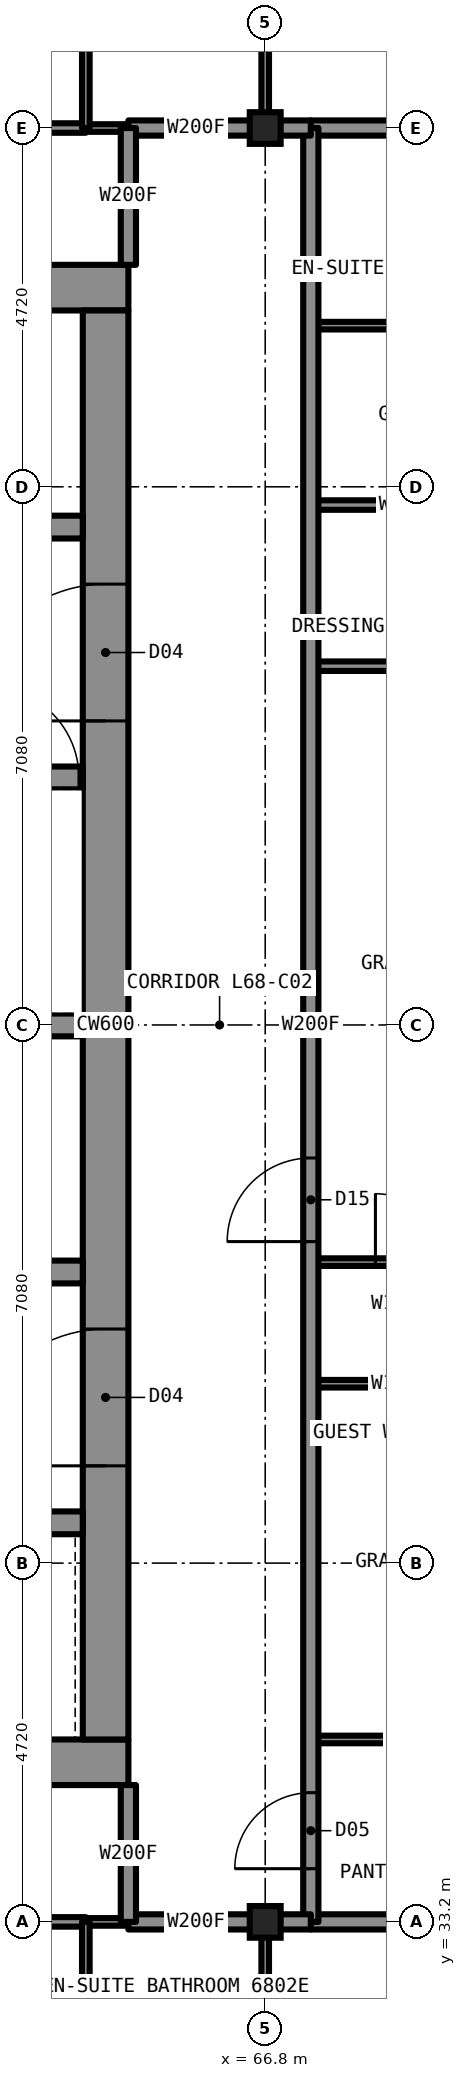
"""IFC4 building model, lengths in metres.
Left out: names, types, materials, properties, quantities, classifications, styles, units other than length and angle.
Written with IfcOpenShell. Run it as: python <this file> out.ifc"""

import sys

from ifc_helpers import new_model, si_unit, direction, frame, frame_2d, origin, origin_2d, place, context, subcontext, project, spatial, rectangle, i_section, extrude, element, fill, save


model = new_model("IFC4")
c1 = context("Model", 3, precision=1e-05, world=origin(), true_north=direction((0.0, 1.0)))
c2 = subcontext(c1, "Body", "Model", "MODEL_VIEW")
j1 = project(units=[si_unit("LENGTHUNIT", "METRE"), si_unit("PLANEANGLEUNIT", "RADIAN")], contexts=[c1])
p1 = place(None, origin())
s1 = spatial("IfcSite", under=j1, at=p1, CompositionType="ELEMENT")
p2 = place(p1, origin())
s2 = spatial("IfcBuilding", under=s1, at=p2, CompositionType="ELEMENT")
p3 = place(p2, frame((0.0, 0.0, 247.7)))
s3 = spatial("IfcBuildingStorey", under=s2, at=p3, CompositionType="ELEMENT", Elevation=247.7)
for number, where, z_axis, x_axis in (
    (1, (66.8, 33.2, 0.0), (0.0, 0.0, 1.0), (1.0, 0.0, 0.0)),
    (2, (66.8, 56.8, 0.0), (0.0, 0.0, 1.0), (1.0, 0.0, 0.0)),
):
    element("IfcColumn", number, at=place(p3, frame(where, z_axis=z_axis, x_axis=x_axis)), inside=s3, PredefinedType="COLUMN", context=c2, shape_type="SweptSolid", body=[
        extrude(i_section(OverallWidth=0.406, OverallDepth=0.417, WebThickness=0.03, FlangeThickness=0.048, at=origin_2d()), origin(), (0.0, 0.0, 1.0), 3.5),
    ])
for number, where, z_axis, x_axis in (
    (3, (45.0, 54.7, 0.0), (0.0, 0.0, 1.0), (1.0, 0.0, 0.0)),
    (4, (45.0, 35.3, 0.0), (0.0, 0.0, 1.0), (1.0, 0.0, 0.0)),
):
    element("IfcWall", number, at=place(p3, frame(where, z_axis=z_axis, x_axis=x_axis)), inside=s3, PredefinedType="SHEAR", context=c2, shape_type="SweptSolid", body=[
        extrude(rectangle(XDim=20.0, YDim=0.6, at=frame_2d((10.0, 0.0))), origin(), (0.0, 0.0, 1.0), 3.5),
    ])
p4 = place(p3, frame((64.7, 35.6, 0.0), z_axis=(0.0, 0.0, 1.0), x_axis=(0.0, 1.0, 0.0)))
e5 = element("IfcWall", 5, at=p4, inside=s3, PredefinedType="SHEAR", context=c2, shape_type="SweptSolid", body=[
    extrude(rectangle(XDim=18.8, YDim=0.6, at=frame_2d((9.4, 0.0))), origin(), (0.0, 0.0, 1.0), 3.5),
])
p5 = place(p4, frame((13.4, 0.0, 0.0)))
e6 = element("IfcOpeningElement", 6, at=p5, cuts=e5, PredefinedType="OPENING", context=c2, shape_type="SweptSolid", body=[
    extrude(rectangle(XDim=1.8, YDim=2.2, at=frame_2d((0.9, 1.1))), frame((0.0, 0.31, 0.0), z_axis=(0.0, -1.0, 0.0), x_axis=(1.0, 0.0, 0.0)), (0.0, 0.0, 1.0), 0.62),
])
p6 = place(p4, frame((3.6, 0.0, 0.0)))
e7 = element("IfcOpeningElement", 7, at=p6, cuts=e5, PredefinedType="OPENING", context=c2, shape_type="SweptSolid", body=[
    extrude(rectangle(XDim=1.8, YDim=2.2, at=frame_2d((0.9, 1.1))), frame((0.0, 0.31, 0.0), z_axis=(0.0, -1.0, 0.0), x_axis=(1.0, 0.0, 0.0)), (0.0, 0.0, 1.0), 0.62),
])
p7 = place(p3, frame((45.6, 51.55, 0.0), z_axis=(0.0, 0.0, 1.0), x_axis=(1.0, 0.0, 0.0)))
e8 = element("IfcWall", 8, at=p7, inside=s3, PredefinedType="SHEAR", context=c2, shape_type="SweptSolid", body=[
    extrude(rectangle(XDim=18.8, YDim=0.3, at=frame_2d((9.4, 0.0))), origin(), (0.0, 0.0, 1.0), 3.5),
])
p8 = place(p7, frame((4.8, 0.0, 0.0)))
e9 = element("IfcOpeningElement", 9, at=p8, cuts=e8, PredefinedType="OPENING", context=c2, shape_type="SweptSolid", body=[
    extrude(rectangle(XDim=1.0, YDim=2.1, at=frame_2d((0.5, 1.05))), frame((0.0, 0.16, 0.0), z_axis=(0.0, -1.0, 0.0), x_axis=(1.0, 0.0, 0.0)), (0.0, 0.0, 1.0), 0.32),
])
p9 = place(p7, frame((11.6, 0.0, 0.0)))
e10 = element("IfcOpeningElement", 10, at=p9, cuts=e8, PredefinedType="OPENING", context=c2, shape_type="SweptSolid", body=[
    extrude(rectangle(XDim=1.1, YDim=2.2, at=frame_2d((0.55, 1.1))), frame((0.0, 0.16, 0.0), z_axis=(0.0, -1.0, 0.0), x_axis=(1.0, 0.0, 0.0)), (0.0, 0.0, 1.0), 0.32),
])
p10 = place(p7, frame((14.3, 0.0, 0.0)))
e11 = element("IfcOpeningElement", 11, at=p10, cuts=e8, PredefinedType="OPENING", context=c2, shape_type="SweptSolid", body=[
    extrude(rectangle(XDim=1.1, YDim=2.2, at=frame_2d((0.55, 1.1))), frame((0.0, 0.16, 0.0), z_axis=(0.0, -1.0, 0.0), x_axis=(1.0, 0.0, 0.0)), (0.0, 0.0, 1.0), 0.32),
])
p11 = place(p3, frame((45.6, 38.45, 0.0), z_axis=(0.0, 0.0, 1.0), x_axis=(1.0, 0.0, 0.0)))
e12 = element("IfcWall", 12, at=p11, inside=s3, PredefinedType="SHEAR", context=c2, shape_type="SweptSolid", body=[
    extrude(rectangle(XDim=18.8, YDim=0.3, at=frame_2d((9.4, 0.0))), origin(), (0.0, 0.0, 1.0), 3.5),
])
p12 = place(p11, frame((0.7, 0.0, 0.0)))
e13 = element("IfcOpeningElement", 13, at=p12, cuts=e12, PredefinedType="OPENING", context=c2, shape_type="SweptSolid", body=[
    extrude(rectangle(XDim=1.1, YDim=2.2, at=frame_2d((0.55, 1.1))), frame((0.0, 0.16, 0.0), z_axis=(0.0, -1.0, 0.0), x_axis=(1.0, 0.0, 0.0)), (0.0, 0.0, 1.0), 0.32),
])
p13 = place(p11, frame((3.4, 0.0, 0.0)))
e14 = element("IfcOpeningElement", 14, at=p13, cuts=e12, PredefinedType="OPENING", context=c2, shape_type="SweptSolid", body=[
    extrude(rectangle(XDim=1.1, YDim=2.2, at=frame_2d((0.55, 1.1))), frame((0.0, 0.16, 0.0), z_axis=(0.0, -1.0, 0.0), x_axis=(1.0, 0.0, 0.0)), (0.0, 0.0, 1.0), 0.32),
])
p14 = place(p11, frame((6.1, 0.0, 0.0)))
e15 = element("IfcOpeningElement", 15, at=p14, cuts=e12, PredefinedType="OPENING", context=c2, shape_type="SweptSolid", body=[
    extrude(rectangle(XDim=1.1, YDim=2.2, at=frame_2d((0.55, 1.1))), frame((0.0, 0.16, 0.0), z_axis=(0.0, -1.0, 0.0), x_axis=(1.0, 0.0, 0.0)), (0.0, 0.0, 1.0), 0.32),
])
p15 = place(p11, frame((8.8, 0.0, 0.0)))
e16 = element("IfcOpeningElement", 16, at=p15, cuts=e12, PredefinedType="OPENING", context=c2, shape_type="SweptSolid", body=[
    extrude(rectangle(XDim=1.1, YDim=2.2, at=frame_2d((0.55, 1.1))), frame((0.0, 0.16, 0.0), z_axis=(0.0, -1.0, 0.0), x_axis=(1.0, 0.0, 0.0)), (0.0, 0.0, 1.0), 0.32),
])
p16 = place(p3, frame((56.2, 48.25, 0.0), z_axis=(0.0, 0.0, 1.0), x_axis=(1.0, 0.0, 0.0)))
e17 = element("IfcWall", 17, at=p16, inside=s3, PredefinedType="SHEAR", context=c2, shape_type="SweptSolid", body=[
    extrude(rectangle(XDim=8.2, YDim=0.3, at=frame_2d((4.1, 0.0))), origin(), (0.0, 0.0, 1.0), 3.5),
])
p17 = place(p16, frame((6.95, 0.0, 0.0)))
e18 = element("IfcOpeningElement", 18, at=p17, cuts=e17, PredefinedType="OPENING", context=c2, shape_type="SweptSolid", body=[
    extrude(rectangle(XDim=1.2, YDim=2.2, at=frame_2d((0.6, 1.1))), frame((0.0, 0.16, 0.0), z_axis=(0.0, -1.0, 0.0), x_axis=(1.0, 0.0, 0.0)), (0.0, 0.0, 1.0), 0.32),
])
p18 = place(p3, frame((56.2, 41.75, 0.0), z_axis=(0.0, 0.0, 1.0), x_axis=(1.0, 0.0, 0.0)))
e19 = element("IfcWall", 19, at=p18, inside=s3, PredefinedType="SHEAR", context=c2, shape_type="SweptSolid", body=[
    extrude(rectangle(XDim=8.2, YDim=0.3, at=frame_2d((4.1, 0.0))), origin(), (0.0, 0.0, 1.0), 3.5),
])
p19 = place(p18, frame((3.3, 0.0, 0.0)))
e20 = element("IfcOpeningElement", 20, at=p19, cuts=e19, PredefinedType="OPENING", context=c2, shape_type="SweptSolid", body=[
    extrude(rectangle(XDim=1.0, YDim=2.1, at=frame_2d((0.5, 1.05))), frame((0.0, 0.16, 0.0), z_axis=(0.0, -1.0, 0.0), x_axis=(1.0, 0.0, 0.0)), (0.0, 0.0, 1.0), 0.32),
])
p20 = place(p3, frame((56.5, 45.0, 0.0), z_axis=(0.0, 0.0, 1.0), x_axis=(1.0, 0.0, 0.0)))
e21 = element("IfcWall", 21, at=p20, inside=s3, PredefinedType="SHEAR", context=c2, shape_type="SweptSolid", body=[
    extrude(rectangle(XDim=7.9, YDim=0.3, at=frame_2d((3.95, 0.0))), origin(), (0.0, 0.0, 1.0), 3.5),
])
p21 = place(p3, frame((64.44, 33.2, 0.0), z_axis=(0.0, 0.0, 1.0), x_axis=(1.0, 0.0, 0.0)))
e22 = element("IfcWall", 22, at=p21, inside=s3, PredefinedType="PARTITIONING", context=c2, shape_type="SweptSolid", body=[
    extrude(rectangle(XDim=0.56, YDim=0.1, at=frame_2d((0.28, 0.0))), origin(), (0.0, 0.0, 1.0), 3.33),
])
p22 = place(p3, frame((65.0, 33.2, 0.0), z_axis=(0.0, 0.0, 1.0), x_axis=(1.0, 0.0, 0.0)))
e23 = element("IfcWall", 23, at=p22, inside=s3, PredefinedType="PARTITIONING", context=c2, shape_type="SweptSolid", body=[
    extrude(rectangle(XDim=1.78, YDim=0.2, at=frame_2d((0.89, 0.0))), origin(), (0.0, 0.0, 1.0), 3.33),
])
p23 = place(p3, frame((67.4, 33.2, 0.0), z_axis=(0.0, 0.0, 1.0), x_axis=(1.0, 0.0, 0.0)))
e24 = element("IfcWall", 24, at=p23, inside=s3, PredefinedType="PARTITIONING", context=c2, shape_type="SweptSolid", body=[
    extrude(rectangle(XDim=5.3, YDim=0.2, at=frame_2d((2.65, 0.0))), origin(), (0.0, 0.0, 1.0), 2.573),
])
p24 = place(p3, frame((57.36, 33.2, 0.0), z_axis=(0.0, 0.0, 1.0), x_axis=(1.0, 0.0, 0.0)))
e25 = element("IfcWall", 25, at=p24, inside=s3, PredefinedType="PARTITIONING", context=c2, shape_type="SweptSolid", body=[
    extrude(rectangle(XDim=7.08, YDim=0.125, at=frame_2d((3.54, 0.0))), origin(), (0.0, 0.0, 1.0), 3.33),
])
p25 = place(p3, frame((67.4, 41.88, 0.0), z_axis=(0.0, 0.0, 1.0), x_axis=(1.0, 0.0, 0.0)))
e26 = element("IfcWall", 26, at=p25, inside=s3, PredefinedType="PARTITIONING", context=c2, shape_type="SweptSolid", body=[
    extrude(rectangle(XDim=2.2, YDim=0.1, at=frame_2d((1.1, 0.0))), origin(), (0.0, 0.0, 1.0), 3.33),
])
p26 = place(p25, frame((0.85, 0.0, 0.0)))
e27 = element("IfcOpeningElement", 27, at=p26, cuts=e26, PredefinedType="OPENING", context=c2, shape_type="SweptSolid", body=[
    extrude(rectangle(XDim=0.9, YDim=2.1, at=frame_2d((0.45, 1.05))), frame((0.0, 0.06, 0.0), z_axis=(0.0, -1.0, 0.0), x_axis=(1.0, 0.0, 0.0)), (0.0, 0.0, 1.0), 0.12),
])
p27 = place(p3, frame((67.4, 40.28, 0.0), z_axis=(0.0, 0.0, 1.0), x_axis=(1.0, 0.0, 0.0)))
e28 = element("IfcWall", 28, at=p27, inside=s3, PredefinedType="PARTITIONING", context=c2, shape_type="SweptSolid", body=[
    extrude(rectangle(XDim=2.2, YDim=0.1, at=frame_2d((1.1, 0.0))), origin(), (0.0, 0.0, 1.0), 2.797),
])
p28 = place(p3, frame((67.4, 35.6, 0.0), z_axis=(0.0, 0.0, 1.0), x_axis=(1.0, 0.0, 0.0)))
e29 = element("IfcWall", 29, at=p28, inside=s3, PredefinedType="PARTITIONING", context=c2, shape_type="SweptSolid", body=[
    extrude(rectangle(XDim=2.6, YDim=0.1, at=frame_2d((1.3, 0.0))), origin(), (0.0, 0.0, 1.0), 2.797),
])
p29 = place(p3, frame((64.44, 56.8, 0.0), z_axis=(0.0, 0.0, 1.0), x_axis=(1.0, 0.0, 0.0)))
e30 = element("IfcWall", 30, at=p29, inside=s3, PredefinedType="PARTITIONING", context=c2, shape_type="SweptSolid", body=[
    extrude(rectangle(XDim=0.56, YDim=0.1, at=frame_2d((0.28, 0.0))), origin(), (0.0, 0.0, 1.0), 3.33),
])
p30 = place(p3, frame((65.0, 56.8, 0.0), z_axis=(0.0, 0.0, 1.0), x_axis=(1.0, 0.0, 0.0)))
e31 = element("IfcWall", 31, at=p30, inside=s3, PredefinedType="PARTITIONING", context=c2, shape_type="SweptSolid", body=[
    extrude(rectangle(XDim=1.78, YDim=0.2, at=frame_2d((0.89, 0.0))), origin(), (0.0, 0.0, 1.0), 3.33),
])
p31 = place(p3, frame((67.4, 56.8, 0.0), z_axis=(0.0, 0.0, 1.0), x_axis=(1.0, 0.0, 0.0)))
e32 = element("IfcWall", 32, at=p31, inside=s3, PredefinedType="PARTITIONING", context=c2, shape_type="SweptSolid", body=[
    extrude(rectangle(XDim=5.3, YDim=0.2, at=frame_2d((2.65, 0.0))), origin(), (0.0, 0.0, 1.0), 2.573),
])
p32 = place(p3, frame((57.36, 56.8, 0.0), z_axis=(0.0, 0.0, 1.0), x_axis=(1.0, 0.0, 0.0)))
e33 = element("IfcWall", 33, at=p32, inside=s3, PredefinedType="PARTITIONING", context=c2, shape_type="SweptSolid", body=[
    extrude(rectangle(XDim=7.08, YDim=0.125, at=frame_2d((3.54, 0.0))), origin(), (0.0, 0.0, 1.0), 3.33),
])
p33 = place(p3, frame((67.4, 49.72, 0.0), z_axis=(0.0, 0.0, 1.0), x_axis=(1.0, 0.0, 0.0)))
e34 = element("IfcWall", 34, at=p33, inside=s3, PredefinedType="PARTITIONING", context=c2, shape_type="SweptSolid", body=[
    extrude(rectangle(XDim=5.3, YDim=0.125, at=frame_2d((2.65, 0.0))), origin(), (0.0, 0.0, 1.0), 2.797),
])
p34 = place(p33, frame((3.55, 0.0, 0.0)))
e35 = element("IfcOpeningElement", 35, at=p34, cuts=e34, PredefinedType="OPENING", context=c2, shape_type="SweptSolid", body=[
    extrude(rectangle(XDim=0.9, YDim=2.2, at=frame_2d((0.45, 1.1))), frame((0.0, 0.073, 0.0), z_axis=(0.0, -1.0, 0.0), x_axis=(1.0, 0.0, 0.0)), (0.0, 0.0, 1.0), 0.145),
])
p35 = place(p3, frame((67.4, 51.84, 0.0), z_axis=(0.0, 0.0, 1.0), x_axis=(1.0, 0.0, 0.0)))
e36 = element("IfcWall", 36, at=p35, inside=s3, PredefinedType="PARTITIONING", context=c2, shape_type="SweptSolid", body=[
    extrude(rectangle(XDim=2.4, YDim=0.125, at=frame_2d((1.2, 0.0))), origin(), (0.0, 0.0, 1.0), 3.33),
])
p36 = place(p3, frame((67.4, 54.2, 0.0), z_axis=(0.0, 0.0, 1.0), x_axis=(1.0, 0.0, 0.0)))
e37 = element("IfcWall", 37, at=p36, inside=s3, PredefinedType="PARTITIONING", context=c2, shape_type="SweptSolid", body=[
    extrude(rectangle(XDim=3.0, YDim=0.1, at=frame_2d((1.5, 0.0))), origin(), (0.0, 0.0, 1.0), 3.33),
])
for number, where, z_axis, x_axis in (
    (38, (65.0, 33.2, 0.0), (0.0, 0.0, 1.0), (0.0, 1.0, 0.0)),
    (39, (65.0, 55.0, 0.0), (0.0, 0.0, 1.0), (0.0, 1.0, 0.0)),
):
    element("IfcWall", number, at=place(p3, frame(where, z_axis=z_axis, x_axis=x_axis)), inside=s3, PredefinedType="PARTITIONING", context=c2, shape_type="SweptSolid", body=[
        extrude(rectangle(XDim=1.8, YDim=0.2, at=frame_2d((0.9, 0.0))), origin(), (0.0, 0.0, 1.0), 3.33),
    ])
for number, where, z_axis, x_axis in (
    (40, (66.8, 30.4, 0.0), (0.0, 0.0, 1.0), (0.0, 1.0, 0.0)),
    (41, (66.8, 56.8, 0.0), (0.0, 0.0, 1.0), (0.0, 1.0, 0.0)),
):
    element("IfcWall", number, at=place(p3, frame(where, z_axis=z_axis, x_axis=x_axis)), inside=s3, PredefinedType="PARTITIONING", context=c2, shape_type="SweptSolid", body=[
        extrude(rectangle(XDim=2.8, YDim=0.1, at=frame_2d((1.4, 0.0))), origin(), (0.0, 0.0, 1.0), 2.573),
    ])
p37 = place(p3, frame((67.4, 33.2, 0.0), z_axis=(0.0, 0.0, 1.0), x_axis=(0.0, 1.0, 0.0)))
e42 = element("IfcWall", 42, at=p37, inside=s3, PredefinedType="PARTITIONING", context=c2, shape_type="SweptSolid", body=[
    extrude(rectangle(XDim=23.6, YDim=0.2, at=frame_2d((11.8, 0.0))), origin(), (0.0, 0.0, 1.0), 3.33),
])
p38 = place(p37, frame((8.95, 0.0, 0.0)))
e43 = element("IfcOpeningElement", 43, at=p38, cuts=e42, PredefinedType="OPENING", context=c2, shape_type="SweptSolid", body=[
    extrude(rectangle(XDim=1.1, YDim=2.2, at=frame_2d((0.55, 1.1))), frame((0.0, 0.11, 0.0), z_axis=(0.0, -1.0, 0.0), x_axis=(1.0, 0.0, 0.0)), (0.0, 0.0, 1.0), 0.22),
])
p39 = place(p37, frame((0.7, 0.0, 0.0)))
e44 = element("IfcOpeningElement", 44, at=p39, cuts=e42, PredefinedType="OPENING", context=c2, shape_type="SweptSolid", body=[
    extrude(rectangle(XDim=1.0, YDim=2.1, at=frame_2d((0.5, 1.05))), frame((0.0, 0.11, 0.0), z_axis=(0.0, -1.0, 0.0), x_axis=(1.0, 0.0, 0.0)), (0.0, 0.0, 1.0), 0.22),
])
for number, where, z_axis, x_axis in (
    (45, (64.44, 30.4, 0.0), (0.0, 0.0, 1.0), (0.0, 1.0, 0.0)),
    (46, (64.44, 56.8, 0.0), (0.0, 0.0, 1.0), (0.0, 1.0, 0.0)),
):
    element("IfcWall", number, at=place(p3, frame(where, z_axis=z_axis, x_axis=x_axis)), inside=s3, PredefinedType="PARTITIONING", context=c2, shape_type="SweptSolid", body=[
        extrude(rectangle(XDim=2.8, YDim=0.1, at=frame_2d((1.4, 0.0))), origin(), (0.0, 0.0, 1.0), 3.33),
    ])
for number, where, z_axis, x_axis in (
    (47, (66.78, 33.2, 0.0), (0.0, 0.0, 1.0), (1.0, 0.0, 0.0)),
    (48, (66.78, 56.8, 0.0), (0.0, 0.0, 1.0), (1.0, 0.0, 0.0)),
):
    element("IfcWall", number, at=place(p3, frame(where, z_axis=z_axis, x_axis=x_axis)), inside=s3, PredefinedType="PARTITIONING", context=c2, shape_type="SweptSolid", body=[
        extrude(rectangle(XDim=0.62, YDim=0.2, at=frame_2d((0.31, 0.0))), origin(), (0.0, 0.0, 1.0), 2.573),
    ])
p40 = place(p38, origin())
e49 = element("IfcDoor", 49, at=p40, inside=s3, OperationType="SINGLE_SWING_LEFT", PredefinedType="DOOR", context=c2, shape_type="SweptSolid", body=[
    extrude(rectangle(XDim=1.1, YDim=2.2, at=frame_2d((0.55, 1.1))), frame((0.0, 0.025, 0.0), z_axis=(0.0, -1.0, 0.0), x_axis=(1.0, 0.0, 0.0)), (0.0, 0.0, 1.0), 0.05),
])
fill(e43, e49)
p41 = place(p39, origin())
e50 = element("IfcDoor", 50, at=p41, inside=s3, OperationType="SINGLE_SWING_LEFT", PredefinedType="DOOR", context=c2, shape_type="SweptSolid", body=[
    extrude(rectangle(XDim=1.0, YDim=2.1, at=frame_2d((0.5, 1.05))), frame((0.0, 0.025, 0.0), z_axis=(0.0, -1.0, 0.0), x_axis=(1.0, 0.0, 0.0)), (0.0, 0.0, 1.0), 0.05),
])
fill(e44, e50)
p42 = place(p26, origin())
e51 = element("IfcDoor", 51, at=p42, inside=s3, OperationType="SINGLE_SWING_LEFT", PredefinedType="DOOR", context=c2, shape_type="SweptSolid", body=[
    extrude(rectangle(XDim=0.9, YDim=2.1, at=frame_2d((0.45, 1.05))), frame((0.0, 0.025, 0.0), z_axis=(0.0, -1.0, 0.0), x_axis=(1.0, 0.0, 0.0)), (0.0, 0.0, 1.0), 0.05),
])
fill(e27, e51)
p43 = place(p5, origin())
e52 = element("IfcDoor", 52, at=p43, inside=s3, OperationType="DOUBLE_DOOR_SINGLE_SWING", PredefinedType="DOOR", context=c2, shape_type="SweptSolid", body=[
    extrude(rectangle(XDim=1.8, YDim=2.2, at=frame_2d((0.9, 1.1))), frame((0.0, 0.025, 0.0), z_axis=(0.0, -1.0, 0.0), x_axis=(1.0, 0.0, 0.0)), (0.0, 0.0, 1.0), 0.05),
])
fill(e6, e52)
p44 = place(p6, origin())
e53 = element("IfcDoor", 53, at=p44, inside=s3, OperationType="DOUBLE_DOOR_SINGLE_SWING", PredefinedType="DOOR", context=c2, shape_type="SweptSolid", body=[
    extrude(rectangle(XDim=1.8, YDim=2.2, at=frame_2d((0.9, 1.1))), frame((0.0, 0.025, 0.0), z_axis=(0.0, -1.0, 0.0), x_axis=(1.0, 0.0, 0.0)), (0.0, 0.0, 1.0), 0.05),
])
fill(e7, e53)
p45 = place(p17, origin())
e54 = element("IfcDoor", 54, at=p45, inside=s3, OperationType="SINGLE_SWING_LEFT", PredefinedType="DOOR", context=c2, shape_type="SweptSolid", body=[
    extrude(rectangle(XDim=1.2, YDim=2.2, at=frame_2d((0.6, 1.1))), frame((0.0, 0.025, 0.0), z_axis=(0.0, -1.0, 0.0), x_axis=(1.0, 0.0, 0.0)), (0.0, 0.0, 1.0), 0.05),
])
fill(e18, e54)
save(model, sys.argv[1])
